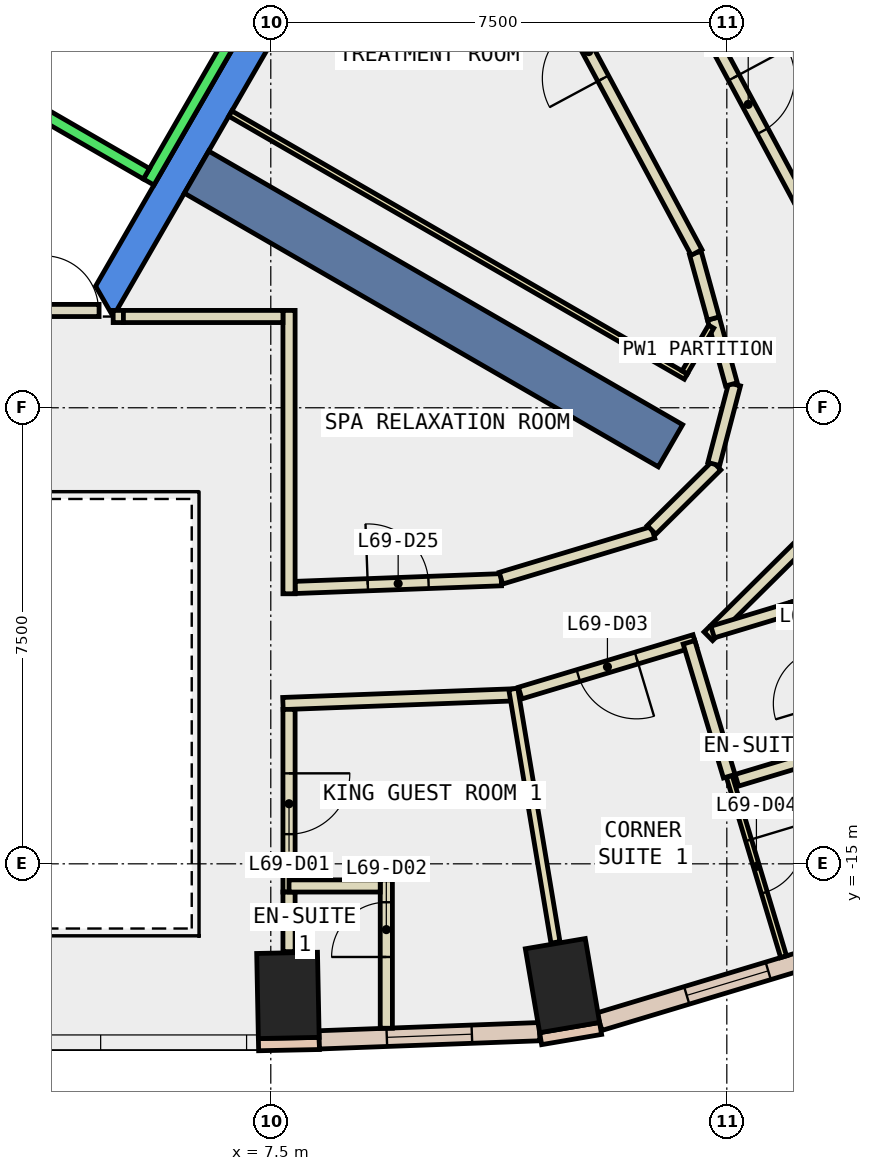
"""IFC4 building model, lengths in metres.
Left out: names, types, materials, properties, quantities, classifications, styles, units other than length and angle.
Written with IfcOpenShell. Run it as: python <this file> out.ifc"""

import sys

from ifc_helpers import new_model, si_unit, direction, frame, frame_2d, origin, origin_2d, place, context, subcontext, project, spatial, polyline, rectangle, outline, extrude, element, fill, save


model = new_model("IFC4")
c1 = context("Model", 3, precision=1e-05, world=origin(), true_north=direction((0.0, 1.0)))
c2 = subcontext(c1, "Body", "Model", "MODEL_VIEW")
j1 = project(units=[si_unit("LENGTHUNIT", "METRE"), si_unit("PLANEANGLEUNIT", "RADIAN")], contexts=[c1])
p1 = place(None, origin())
s1 = spatial("IfcSite", under=j1, at=p1, CompositionType="ELEMENT")
p2 = place(p1, origin())
s2 = spatial("IfcBuilding", under=s1, at=p2, CompositionType="ELEMENT")
p3 = place(p2, frame((0.0, 0.0, 297.2)))
s3 = spatial("IfcBuildingStorey", under=s2, at=p3, CompositionType="ELEMENT", Elevation=297.2)
for number, where, z_axis, x_axis in (
    (1, (7.782, -17.164, -0.34), (0.0, 0.0, 1.0), (1.0, 0.02, 0.0)),
    (2, (12.297, -17.003, -0.34), (0.0, 0.0, 1.0), (0.986, 0.168, 0.0)),
):
    element("IfcColumn", number, at=place(p3, frame(where, z_axis=z_axis, x_axis=x_axis)), inside=s3, PredefinedType="COLUMN", context=c2, shape_type="SweptSolid", body=[
        extrude(rectangle(XDim=1.0, YDim=1.4, at=origin_2d()), origin(), (0.0, 0.0, 1.0), 3.6),
    ])
p4 = place(p3, frame((0.0, 0.0, -0.34)))
e3 = element("IfcWall", 3, at=p4, inside=s3, PredefinedType="SHEAR", context=c2, shape_type="SweptSolid", body=[
    extrude(outline(polyline([(4.907, -6.0), (9.815, 2.5), (9.238, 2.5), (4.619, -5.5), (4.907, -6.0)])), origin(), (0.0, 0.0, 1.0), 3.6),
])
p5 = place(p3, frame((6.279, -3.625, -0.34), z_axis=(0.0, 0.0, 1.0), x_axis=(0.866017533419, -0.500013631625, 0.0)))
e4 = element("IfcWall", 4, at=p5, inside=s3, PredefinedType="SHEAR", context=c2, shape_type="SweptSolid", body=[
    extrude(rectangle(XDim=9.0, YDim=0.8, at=frame_2d((4.5, 0.0))), origin(), (0.0, 0.0, 1.0), 3.6),
])
for number, where, z_axis, x_axis in (
    (5, (7.298, -17.974, 0.0), (0.0, 0.0, 1.0), (1.0, 0.02, 0.0)),
    (6, (11.938, -17.875, 0.0), (0.0, 0.0, 1.0), (0.986, 0.168, 0.0)),
):
    element("IfcWall", number, at=place(p3, frame(where, z_axis=z_axis, x_axis=x_axis)), inside=s3, PredefinedType="STANDARD", context=c2, shape_type="SweptSolid", body=[
        extrude(rectangle(XDim=1.0, YDim=0.2, at=frame_2d((0.5, 0.0))), origin(), (0.0, 0.0, 1.0), 3.26),
    ])
p6 = place(p3, frame((8.296, -17.895, 0.0), z_axis=(0.0, 0.0, 1.0), x_axis=(0.999306787149, 0.037228284377, 0.0)))
e7 = element("IfcWall", 7, at=p6, inside=s3, PredefinedType="STANDARD", context=c2, shape_type="SweptSolid", body=[
    extrude(rectangle(XDim=3.626, YDim=0.3, at=frame_2d((1.813, 0.0))), origin(), (0.0, 0.0, 1.0), 3.26),
])
p7 = place(p6, frame((1.113, 0.0, 0.9)))
e8 = element("IfcOpeningElement", 8, at=p7, cuts=e7, PredefinedType="OPENING", context=c2, shape_type="SweptSolid", body=[
    extrude(rectangle(XDim=1.4, YDim=2.0, at=frame_2d((0.7, 1.0))), frame((0.0, 0.16, 0.0), z_axis=(0.0, -1.0, 0.0), x_axis=(1.0, 0.0, 0.0)), (0.0, 0.0, 1.0), 0.32),
])
p8 = place(p3, frame((12.904, -17.596, 0.0), z_axis=(0.0, 0.0, 1.0), x_axis=(0.957563190743, 0.288223412884, 0.0)))
e9 = element("IfcWall", 9, at=p8, inside=s3, PredefinedType="STANDARD", context=c2, shape_type="SweptSolid", body=[
    extrude(rectangle(XDim=4.4, YDim=0.3, at=frame_2d((2.2, 0.0))), origin(), (0.0, 0.0, 1.0), 3.26),
])
p9 = place(p8, frame((1.5, 0.0, 0.9)))
e10 = element("IfcOpeningElement", 10, at=p9, cuts=e9, PredefinedType="OPENING", context=c2, shape_type="SweptSolid", body=[
    extrude(rectangle(XDim=1.4, YDim=2.0, at=frame_2d((0.7, 1.0))), frame((0.0, 0.16, 0.0), z_axis=(0.0, -1.0, 0.0), x_axis=(1.0, 0.0, 0.0)), (0.0, 0.0, 1.0), 0.32),
])
p10 = place(p3, frame((7.9, -10.455, 0.0), z_axis=(0.0, 0.0, 1.0), x_axis=(0.999297278907, 0.037482640915, 0.0)))
e11 = element("IfcWall", 11, at=p10, inside=s3, PredefinedType="PARTITIONING", context=c2, shape_type="SweptSolid", body=[
    extrude(rectangle(XDim=3.394, YDim=0.2, at=frame_2d((1.697, 0.0))), origin(), (0.0, 0.0, 1.0), 3.26),
])
p11 = place(p10, frame((1.196, 0.0, 0.0)))
e12 = element("IfcOpeningElement", 12, at=p11, cuts=e11, PredefinedType="OPENING", context=c2, shape_type="SweptSolid", body=[
    extrude(rectangle(XDim=1.0, YDim=2.1, at=frame_2d((0.5, 1.05))), frame((0.0, 0.11, 0.0), z_axis=(0.0, -1.0, 0.0), x_axis=(1.0, 0.0, 0.0)), (0.0, 0.0, 1.0), 0.22),
])
p12 = place(p3, frame((11.286, -10.303, 0.0), z_axis=(0.0, 0.0, 1.0), x_axis=(0.957555754851, 0.288248115955, 0.0)))
e13 = element("IfcWall", 13, at=p12, inside=s3, PredefinedType="PARTITIONING", context=c2, shape_type="SweptSolid", body=[
    extrude(rectangle(XDim=2.612, YDim=0.2, at=frame_2d((1.306, 0.0))), origin(), (0.0, 0.0, 1.0), 3.26),
])
p13 = place(p3, frame((13.762, -9.509, 0.0), z_axis=(0.0, 0.0, 1.0), x_axis=(0.710749293824, 0.703445407497, 0.0)))
e14 = element("IfcWall", 14, at=p13, inside=s3, PredefinedType="PARTITIONING", context=c2, shape_type="SweptSolid", body=[
    extrude(rectangle(XDim=1.504, YDim=0.2, at=frame_2d((0.752, 0.0))), origin(), (0.0, 0.0, 1.0), 3.26),
])
p14 = place(p3, frame((14.785, -8.425, 0.0), z_axis=(0.0, 0.0, 1.0), x_axis=(0.253295121261, 0.967389053869, 0.0)))
e15 = element("IfcWall", 15, at=p14, inside=s3, PredefinedType="PARTITIONING", context=c2, shape_type="SweptSolid", body=[
    extrude(rectangle(XDim=1.354, YDim=0.2, at=frame_2d((0.677, 0.0))), origin(), (0.0, 0.0, 1.0), 3.26),
])
p15 = place(p3, frame((15.076, -7.115, 0.0), z_axis=(0.0, 0.0, 1.0), x_axis=(-0.264368116744, 0.964421846937, 0.0)))
e16 = element("IfcWall", 16, at=p15, inside=s3, PredefinedType="PARTITIONING", context=c2, shape_type="SweptSolid", body=[
    extrude(rectangle(XDim=1.123, YDim=0.2, at=frame_2d((0.562, 0.0))), origin(), (0.0, 0.0, 1.0), 3.26),
])
p16 = place(p3, frame((14.779, -6.032, 0.0), z_axis=(0.0, 0.0, 1.0), x_axis=(-0.265740072272, 0.964044715762, 0.0)))
e17 = element("IfcWall", 17, at=p16, inside=s3, PredefinedType="PARTITIONING", context=c2, shape_type="SweptSolid", body=[
    extrude(rectangle(XDim=1.118, YDim=0.2, at=frame_2d((0.559, 0.0))), origin(), (0.0, 0.0, 1.0), 3.26),
])
p17 = place(p3, frame((14.503, -4.946, 0.0), z_axis=(0.0, 0.0, 1.0), x_axis=(-0.473101362557, 0.881008002658, 0.0)))
e18 = element("IfcWall", 18, at=p17, inside=s3, PredefinedType="PARTITIONING", context=c2, shape_type="SweptSolid", body=[
    extrude(rectangle(XDim=7.497, YDim=0.2, at=frame_2d((3.749, 0.0))), origin(), (0.0, 0.0, 1.0), 3.26),
])
p18 = place(p17, frame((3.249, 0.0, 0.0)))
e19 = element("IfcOpeningElement", 19, at=p18, cuts=e18, PredefinedType="OPENING", context=c2, shape_type="SweptSolid", body=[
    extrude(rectangle(XDim=1.0, YDim=2.1, at=frame_2d((0.5, 1.05))), frame((0.0, 0.11, 0.0), z_axis=(0.0, -1.0, 0.0), x_axis=(1.0, 0.0, 0.0)), (0.0, 0.0, 1.0), 0.22),
])
p19 = place(p3, frame((11.53, -12.22, 0.0), z_axis=(0.0, 0.0, 1.0), x_axis=(-0.999293554816, -0.037581794833, 0.0)))
e20 = element("IfcWall", 20, at=p19, inside=s3, PredefinedType="PARTITIONING", context=c2, shape_type="SweptSolid", body=[
    extrude(rectangle(XDim=3.833, YDim=0.2, at=frame_2d((1.917, 0.0))), origin(), (0.0, 0.0, 1.0), 3.26),
])
p20 = place(p3, frame((14.473, -11.328, 0.0), z_axis=(0.0, 0.0, 1.0), x_axis=(-0.957599689503, -0.288102125406, 0.0)))
e21 = element("IfcWall", 21, at=p20, inside=s3, PredefinedType="PARTITIONING", context=c2, shape_type="SweptSolid", body=[
    extrude(rectangle(XDim=2.999, YDim=0.2, at=frame_2d((1.5, 0.0))), origin(), (0.0, 0.0, 1.0), 3.26),
])
p21 = place(p20, frame((1.0, 0.0, 0.0)))
e22 = element("IfcOpeningElement", 22, at=p21, cuts=e21, PredefinedType="OPENING", context=c2, shape_type="SweptSolid", body=[
    extrude(rectangle(XDim=1.0, YDim=2.1, at=frame_2d((0.5, 1.05))), frame((0.0, 0.11, 0.0), z_axis=(0.0, -1.0, 0.0), x_axis=(1.0, 0.0, 0.0)), (0.0, 0.0, 1.0), 0.22),
])
p22 = place(p3, frame((16.537, -9.436, 0.0), z_axis=(0.0, 0.0, 1.0), x_axis=(-0.710773151724, -0.703421301063, 0.0)))
e23 = element("IfcWall", 23, at=p22, inside=s3, PredefinedType="PARTITIONING", context=c2, shape_type="SweptSolid", body=[
    extrude(rectangle(XDim=2.59, YDim=0.2, at=frame_2d((1.295, 0.0))), origin(), (0.0, 0.0, 1.0), 3.26),
])
p23 = place(p3, frame((14.461, -0.852, 0.0), z_axis=(0.0, 0.0, 1.0), x_axis=(0.473160180459, -0.88097641491, 0.0)))
e24 = element("IfcWall", 24, at=p23, inside=s3, PredefinedType="PARTITIONING", context=c2, shape_type="SweptSolid", body=[
    extrude(rectangle(XDim=3.766, YDim=0.2, at=frame_2d((1.883, 0.0))), origin(), (0.0, 0.0, 1.0), 3.26),
])
p24 = place(p23, frame((1.383, 0.0, 0.0)))
e25 = element("IfcOpeningElement", 25, at=p24, cuts=e24, PredefinedType="OPENING", context=c2, shape_type="SweptSolid", body=[
    extrude(rectangle(XDim=1.0, YDim=2.1, at=frame_2d((0.5, 1.05))), frame((0.0, 0.11, 0.0), z_axis=(0.0, -1.0, 0.0), x_axis=(1.0, 0.0, 0.0)), (0.0, 0.0, 1.0), 0.22),
])
p25 = place(p3, frame((4.908, -5.999, 0.0), z_axis=(0.0, 0.0, 1.0), x_axis=(1.0, 0.0, 0.0)))
e26 = element("IfcWall", 26, at=p25, inside=s3, PredefinedType="PARTITIONING", context=c2, shape_type="SweptSolid", body=[
    extrude(rectangle(XDim=0.168, YDim=0.2, at=frame_2d((0.084, 0.0))), origin(), (0.0, 0.0, 1.0), 2.4),
])
p26 = place(p3, frame((7.8, -5.899, 0.0), z_axis=(0.0, 0.0, 1.0), x_axis=(0.0, -1.0, 0.0)))
e27 = element("IfcWall", 27, at=p26, inside=s3, PredefinedType="PARTITIONING", context=c2, shape_type="SweptSolid", body=[
    extrude(rectangle(XDim=4.66, YDim=0.2, at=frame_2d((2.33, 0.0))), origin(), (0.0, 0.0, 1.0), 3.26),
])
p27 = place(p3, frame((7.8, -12.46, 0.0), z_axis=(0.0, 0.0, 1.0), x_axis=(0.0, -1.0, 0.0)))
e28 = element("IfcWall", 28, at=p27, inside=s3, PredefinedType="PARTITIONING", context=c2, shape_type="SweptSolid", body=[
    extrude(rectangle(XDim=3.004, YDim=0.2, at=frame_2d((1.502, 0.0))), origin(), (0.0, 0.0, 1.0), 3.26),
])
p28 = place(p27, frame((1.052, 0.0, 0.0)))
e29 = element("IfcOpeningElement", 29, at=p28, cuts=e28, PredefinedType="OPENING", context=c2, shape_type="SweptSolid", body=[
    extrude(rectangle(XDim=1.0, YDim=2.1, at=frame_2d((0.5, 1.05))), frame((0.0, 0.11, 0.0), z_axis=(0.0, -1.0, 0.0), x_axis=(1.0, 0.0, 0.0)), (0.0, 0.0, 1.0), 0.22),
])
p29 = place(p3, frame((7.8, -15.464, 0.0), z_axis=(0.0, 0.0, 1.0), x_axis=(0.0, -1.0, 0.0)))
e30 = element("IfcWall", 30, at=p29, inside=s3, PredefinedType="PARTITIONING", context=c2, shape_type="SweptSolid", body=[
    extrude(rectangle(XDim=0.98, YDim=0.2, at=frame_2d((0.49, 0.0))), origin(), (0.0, 0.0, 1.0), 3.26),
])
p30 = place(p3, frame((6.835, -2.662, 0.0), z_axis=(0.0, 0.0, 1.0), x_axis=(0.866023427642, -0.500003422764, 0.0)))
e31 = element("IfcWall", 31, at=p30, inside=s3, PredefinedType="PARTITIONING", context=c2, shape_type="SweptSolid", body=[
    extrude(rectangle(XDim=8.65, YDim=0.1, at=frame_2d((4.325, 0.0))), origin(), (0.0, 0.0, 1.0), 3.26),
])
p31 = place(p3, frame((14.307, -6.919, 0.0), z_axis=(0.0, 0.0, 1.0), x_axis=(0.500305662732, 0.865848857387, 0.0)))
e32 = element("IfcWall", 32, at=p31, inside=s3, PredefinedType="PARTITIONING", context=c2, shape_type="SweptSolid", body=[
    extrude(rectangle(XDim=0.87, YDim=0.1, at=frame_2d((0.435, 0.0))), origin(), (0.0, 0.0, 1.0), 3.26),
])
p32 = place(p3, frame((9.4, -17.704, 0.0), z_axis=(0.0, 0.0, 1.0), x_axis=(0.0, 1.0, 0.0)))
e33 = element("IfcWall", 33, at=p32, inside=s3, PredefinedType="PARTITIONING", context=c2, shape_type="SweptSolid", body=[
    extrude(rectangle(XDim=2.44, YDim=0.2, at=frame_2d((1.22, 0.0))), origin(), (0.0, 0.0, 1.0), 3.26),
])
p33 = place(p32, frame((1.172, 0.0, 0.0)))
e34 = element("IfcOpeningElement", 34, at=p33, cuts=e33, PredefinedType="OPENING", context=c2, shape_type="SweptSolid", body=[
    extrude(rectangle(XDim=0.9, YDim=2.1, at=frame_2d((0.45, 1.05))), frame((0.0, 0.11, 0.0), z_axis=(0.0, -1.0, 0.0), x_axis=(1.0, 0.0, 0.0)), (0.0, 0.0, 1.0), 0.22),
])
p34 = place(p3, frame((9.3, -15.364, 0.0), z_axis=(0.0, 0.0, 1.0), x_axis=(-1.0, 0.0, 0.0)))
e35 = element("IfcWall", 35, at=p34, inside=s3, PredefinedType="PARTITIONING", context=c2, shape_type="SweptSolid", body=[
    extrude(rectangle(XDim=1.5, YDim=0.2, at=frame_2d((0.75, 0.0))), origin(), (0.0, 0.0, 1.0), 3.26),
])
p35 = place(p3, frame((11.488, -12.123, 0.0), z_axis=(0.0, 0.0, 1.0), x_axis=(0.164174159643, -0.986431368776, 0.0)))
e36 = element("IfcWall", 36, at=p35, inside=s3, PredefinedType="PARTITIONING", context=c2, shape_type="SweptSolid", body=[
    extrude(rectangle(XDim=4.226, YDim=0.15, at=frame_2d((2.113, 0.0))), origin(), (0.0, 0.0, 1.0), 3.26),
])
p36 = place(p3, frame((15.04, -13.559, 0.0), z_axis=(0.0, 0.0, 1.0), x_axis=(0.288337370875, -0.957528882362, 0.0)))
e37 = element("IfcWall", 37, at=p36, inside=s3, PredefinedType="PARTITIONING", context=c2, shape_type="SweptSolid", body=[
    extrude(rectangle(XDim=3.101, YDim=0.1, at=frame_2d((1.55, 0.0))), origin(), (0.0, 0.0, 1.0), 3.26),
])
p37 = place(p36, frame((1.1, 0.0, 0.0)))
e38 = element("IfcOpeningElement", 38, at=p37, cuts=e37, PredefinedType="OPENING", context=c2, shape_type="SweptSolid", body=[
    extrude(rectangle(XDim=0.9, YDim=2.1, at=frame_2d((0.45, 1.05))), frame((0.0, 0.06, 0.0), z_axis=(0.0, -1.0, 0.0), x_axis=(1.0, 0.0, 0.0)), (0.0, 0.0, 1.0), 0.12),
])
p38 = place(p3, frame((14.378, -11.357, 0.0), z_axis=(0.0, 0.0, 1.0), x_axis=(0.287932252498, -0.957650780802, 0.0)))
e39 = element("IfcWall", 39, at=p38, inside=s3, PredefinedType="PARTITIONING", context=c2, shape_type="SweptSolid", body=[
    extrude(rectangle(XDim=2.3, YDim=0.2, at=frame_2d((1.15, 0.0))), origin(), (0.0, 0.0, 1.0), 3.26),
])
p39 = place(p3, frame((15.165, -13.626, 0.0), z_axis=(0.0, 0.0, 1.0), x_axis=(0.957565028189, 0.288217308275, 0.0)))
e40 = element("IfcWall", 40, at=p39, inside=s3, PredefinedType="PARTITIONING", context=c2, shape_type="SweptSolid", body=[
    extrude(rectangle(XDim=1.7, YDim=0.2, at=frame_2d((0.85, 0.0))), origin(), (0.0, 0.0, 1.0), 3.26),
])
p40 = place(p3, frame((16.917, -13.203, 0.0), z_axis=(0.0, 0.0, 1.0), x_axis=(-0.287998855134, 0.957630753183, 0.0)))
e41 = element("IfcWall", 41, at=p40, inside=s3, PredefinedType="PARTITIONING", context=c2, shape_type="SweptSolid", body=[
    extrude(rectangle(XDim=2.649, YDim=0.2, at=frame_2d((1.325, 0.0))), origin(), (0.0, 0.0, 1.0), 3.26),
])
p41 = place(p40, frame((0.875, 0.0, 0.0)))
e42 = element("IfcOpeningElement", 42, at=p41, cuts=e41, PredefinedType="OPENING", context=c2, shape_type="SweptSolid", body=[
    extrude(rectangle(XDim=0.9, YDim=2.1, at=frame_2d((0.45, 1.05))), frame((0.0, 0.11, 0.0), z_axis=(0.0, -1.0, 0.0), x_axis=(1.0, 0.0, 0.0)), (0.0, 0.0, 1.0), 0.22),
])
p42 = place(p3, frame((16.087, -10.79, 0.0), z_axis=(0.0, 0.0, 1.0), x_axis=(-0.957425655367, -0.288679951581, 0.0)))
e43 = element("IfcWall", 43, at=p42, inside=s3, PredefinedType="PARTITIONING", context=c2, shape_type="SweptSolid", body=[
    extrude(rectangle(XDim=1.378, YDim=0.2, at=frame_2d((0.689, 0.0))), origin(), (0.0, 0.0, 1.0), 3.26),
])
p43 = place(p3, frame((3.75, -5.9, 0.0), z_axis=(0.0, 0.0, 1.0), x_axis=(1.0, 0.0, 0.0)))
e44 = element("IfcWall", 44, at=p43, inside=s3, PredefinedType="PARTITIONING", context=c2, shape_type="SweptSolid", body=[
    extrude(rectangle(XDim=0.926, YDim=0.2, at=frame_2d((0.463, 0.0))), origin(), (0.0, 0.0, 1.0), 2.4),
])
p44 = place(p43, frame((0.017, 0.0, 0.0)))
e45 = element("IfcOpeningElement", 45, at=p44, cuts=e44, PredefinedType="OPENING", context=c2, shape_type="SweptSolid", body=[
    extrude(rectangle(XDim=0.9, YDim=2.1, at=frame_2d((0.45, 1.05))), frame((0.0, 0.11, 0.0), z_axis=(0.0, -1.0, 0.0), x_axis=(1.0, 0.0, 0.0)), (0.0, 0.0, 1.0), 0.22),
])
p45 = place(p3, frame((5.076, -5.999, 0.0), z_axis=(0.0, 0.0, 1.0), x_axis=(1.0, 0.0, 0.0)))
e46 = element("IfcWall", 46, at=p45, inside=s3, PredefinedType="PARTITIONING", context=c2, shape_type="SweptSolid", body=[
    extrude(rectangle(XDim=2.624, YDim=0.2, at=frame_2d((1.312, 0.0))), origin(), (0.0, 0.0, 1.0), 3.26),
])
p46 = place(p3, frame((3.24, -2.488, 0.0), z_axis=(0.0, 0.0, 1.0), x_axis=(0.500034260056, 0.866005622828, 0.0)))
e47 = element("IfcWall", 47, at=p46, inside=s3, PredefinedType="STANDARD", context=c2, shape_type="SweptSolid", body=[
    extrude(rectangle(XDim=5.399, YDim=0.2, at=frame_2d((2.7, 0.0))), origin(), (0.0, 0.0, 1.0), 3.26),
])
p47 = place(p46, frame((3.225, 0.0, 0.0)))
e48 = element("IfcOpeningElement", 48, at=p47, cuts=e47, PredefinedType="OPENING", context=c2, shape_type="SweptSolid", body=[
    extrude(rectangle(XDim=1.1, YDim=2.1, at=frame_2d((0.55, 1.05))), frame((0.0, 0.11, 0.0), z_axis=(0.0, -1.0, 0.0), x_axis=(1.0, 0.0, 0.0)), (0.0, 0.0, 1.0), 0.22),
])
p48 = place(p46, frame((1.225, 0.0, 0.0)))
e49 = element("IfcOpeningElement", 49, at=p48, cuts=e47, PredefinedType="OPENING", context=c2, shape_type="SweptSolid", body=[
    extrude(rectangle(XDim=1.1, YDim=2.1, at=frame_2d((0.55, 1.05))), frame((0.0, 0.11, 0.0), z_axis=(0.0, -1.0, 0.0), x_axis=(1.0, 0.0, 0.0)), (0.0, 0.0, 1.0), 0.22),
])
p49 = place(p3, frame((5.492, -3.788, 0.0), z_axis=(0.0, 0.0, 1.0), x_axis=(0.500034260056, 0.866005622828, 0.0)))
e50 = element("IfcWall", 50, at=p49, inside=s3, PredefinedType="STANDARD", context=c2, shape_type="SweptSolid", body=[
    extrude(rectangle(XDim=5.399, YDim=0.2, at=frame_2d((2.7, 0.0))), origin(), (0.0, 0.0, 1.0), 3.26),
])
p50 = place(p3, frame((3.377, -2.452, 0.0), z_axis=(0.0, 0.0, 1.0), x_axis=(0.865955154139, -0.50012165622, 0.0)))
e51 = element("IfcWall", 51, at=p50, inside=s3, PredefinedType="STANDARD", context=c2, shape_type="SweptSolid", body=[
    extrude(rectangle(XDim=2.4, YDim=0.2, at=frame_2d((1.2, 0.0))), origin(), (0.0, 0.0, 1.0), 3.26),
])
p51 = place(p7, origin())
e52 = element("IfcWindow", 52, at=p51, inside=s3, PartitioningType="SINGLE_PANEL", PredefinedType="WINDOW", context=c2, shape_type="SweptSolid", body=[
    extrude(rectangle(XDim=1.4, YDim=2.0, at=frame_2d((0.7, 1.0))), frame((0.0, 0.03, 0.0), z_axis=(0.0, -1.0, 0.0), x_axis=(1.0, 0.0, 0.0)), (0.0, 0.0, 1.0), 0.06),
])
fill(e8, e52)
p52 = place(p9, origin())
e53 = element("IfcWindow", 53, at=p52, inside=s3, PartitioningType="SINGLE_PANEL", PredefinedType="WINDOW", context=c2, shape_type="SweptSolid", body=[
    extrude(rectangle(XDim=1.4, YDim=2.0, at=frame_2d((0.7, 1.0))), frame((0.0, 0.03, 0.0), z_axis=(0.0, -1.0, 0.0), x_axis=(1.0, 0.0, 0.0)), (0.0, 0.0, 1.0), 0.06),
])
fill(e10, e53)
p53 = place(p28, origin())
e54 = element("IfcDoor", 54, at=p53, inside=s3, OperationType="SINGLE_SWING_RIGHT", PredefinedType="DOOR", context=c2, shape_type="SweptSolid", body=[
    extrude(rectangle(XDim=1.0, YDim=2.1, at=frame_2d((0.5, 1.05))), frame((0.0, 0.025, 0.0), z_axis=(0.0, -1.0, 0.0), x_axis=(1.0, 0.0, 0.0)), (0.0, 0.0, 1.0), 0.05),
])
fill(e29, e54)
p54 = place(p33, origin())
e55 = element("IfcDoor", 55, at=p54, inside=s3, OperationType="SINGLE_SWING_RIGHT", PredefinedType="DOOR", context=c2, shape_type="SweptSolid", body=[
    extrude(rectangle(XDim=0.9, YDim=2.1, at=frame_2d((0.45, 1.05))), frame((0.0, 0.025, 0.0), z_axis=(0.0, -1.0, 0.0), x_axis=(1.0, 0.0, 0.0)), (0.0, 0.0, 1.0), 0.05),
])
fill(e34, e55)
p55 = place(p21, origin())
e56 = element("IfcDoor", 56, at=p55, inside=s3, OperationType="SINGLE_SWING_LEFT", PredefinedType="DOOR", context=c2, shape_type="SweptSolid", body=[
    extrude(rectangle(XDim=1.0, YDim=2.1, at=frame_2d((0.5, 1.05))), frame((0.0, 0.025, 0.0), z_axis=(0.0, -1.0, 0.0), x_axis=(1.0, 0.0, 0.0)), (0.0, 0.0, 1.0), 0.05),
])
fill(e22, e56)
p56 = place(p37, origin())
e57 = element("IfcDoor", 57, at=p56, inside=s3, OperationType="SINGLE_SWING_LEFT", PredefinedType="DOOR", context=c2, shape_type="SweptSolid", body=[
    extrude(rectangle(XDim=0.9, YDim=2.1, at=frame_2d((0.45, 1.05))), frame((0.0, 0.025, 0.0), z_axis=(0.0, -1.0, 0.0), x_axis=(1.0, 0.0, 0.0)), (0.0, 0.0, 1.0), 0.05),
])
fill(e38, e57)
p57 = place(p24, origin())
e58 = element("IfcDoor", 58, at=p57, inside=s3, OperationType="SINGLE_SWING_LEFT", PredefinedType="DOOR", context=c2, shape_type="SweptSolid", body=[
    extrude(rectangle(XDim=1.0, YDim=2.1, at=frame_2d((0.5, 1.05))), frame((0.0, 0.025, 0.0), z_axis=(0.0, -1.0, 0.0), x_axis=(1.0, 0.0, 0.0)), (0.0, 0.0, 1.0), 0.05),
])
fill(e25, e58)
p58 = place(p11, origin())
e59 = element("IfcDoor", 59, at=p58, inside=s3, OperationType="SINGLE_SWING_LEFT", PredefinedType="DOOR", context=c2, shape_type="SweptSolid", body=[
    extrude(rectangle(XDim=1.0, YDim=2.1, at=frame_2d((0.5, 1.05))), frame((0.0, 0.025, 0.0), z_axis=(0.0, -1.0, 0.0), x_axis=(1.0, 0.0, 0.0)), (0.0, 0.0, 1.0), 0.05),
])
fill(e12, e59)
p59 = place(p18, origin())
e60 = element("IfcDoor", 60, at=p59, inside=s3, OperationType="SINGLE_SWING_LEFT", PredefinedType="DOOR", context=c2, shape_type="SweptSolid", body=[
    extrude(rectangle(XDim=1.0, YDim=2.1, at=frame_2d((0.5, 1.05))), frame((0.0, 0.025, 0.0), z_axis=(0.0, -1.0, 0.0), x_axis=(1.0, 0.0, 0.0)), (0.0, 0.0, 1.0), 0.05),
])
fill(e19, e60)
p60 = place(p44, origin())
e61 = element("IfcDoor", 61, at=p60, inside=s3, OperationType="SINGLE_SWING_LEFT", PredefinedType="DOOR", context=c2, shape_type="SweptSolid", body=[
    extrude(rectangle(XDim=0.9, YDim=2.1, at=frame_2d((0.45, 1.05))), frame((0.0, 0.025, 0.0), z_axis=(0.0, -1.0, 0.0), x_axis=(1.0, 0.0, 0.0)), (0.0, 0.0, 1.0), 0.05),
])
fill(e45, e61)
save(model, sys.argv[1])
